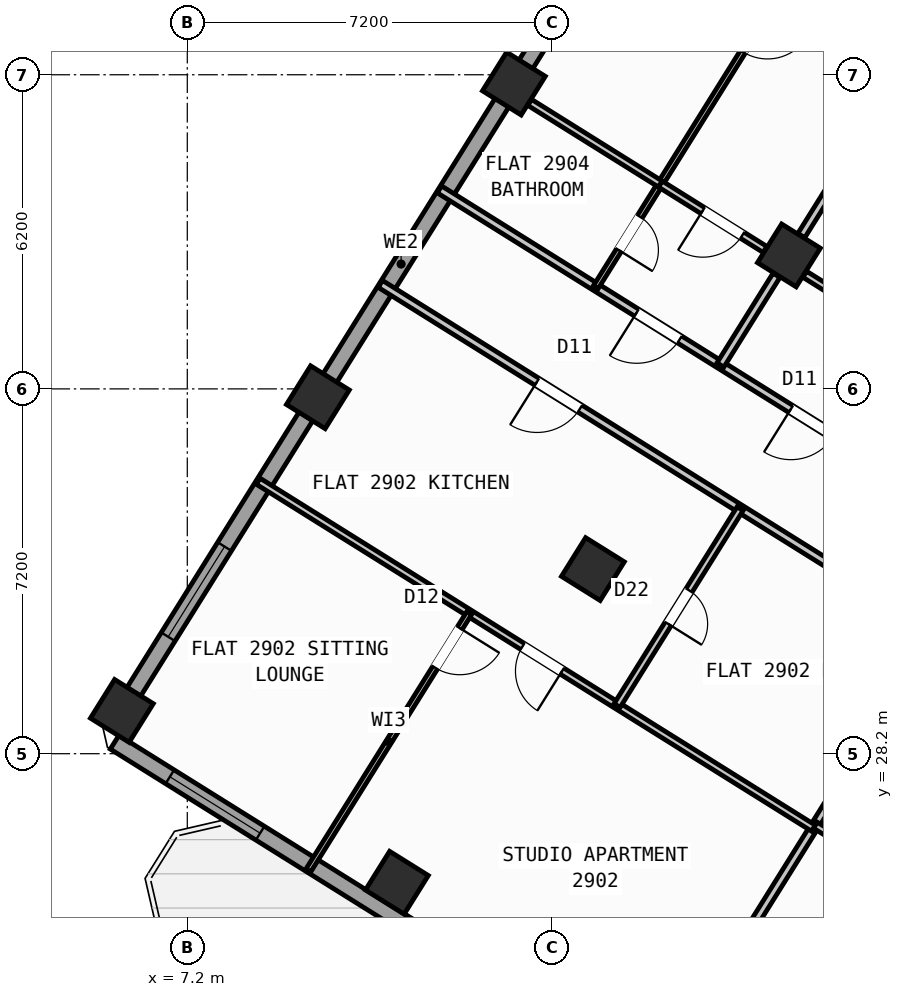
"""IFC4 building model, lengths in metres.
Left out: names, types, materials, properties, quantities, classifications, styles, units other than length and angle.
Written with IfcOpenShell. Run it as: python <this file> out.ifc"""

import sys

from ifc_helpers import new_model, si_unit, direction, frame, frame_2d, origin, origin_2d, place, context, subcontext, project, spatial, rectangle, hollow_rectangle, extrude, source, transform, mapped, element, fill, save


model = new_model("IFC4")
c1 = context("Model", 3, precision=1e-05, world=origin(), true_north=direction((0.0, 1.0)))
c2 = subcontext(c1, "Body", "Model", "MODEL_VIEW")
j1 = project(units=[si_unit("LENGTHUNIT", "METRE"), si_unit("PLANEANGLEUNIT", "RADIAN")], contexts=[c1])
p1 = place(None, origin())
s1 = spatial("IfcSite", under=j1, at=p1, CompositionType="ELEMENT")
p2 = place(p1, origin())
s2 = spatial("IfcBuilding", under=s1, at=p2, CompositionType="ELEMENT")
p3 = place(p2, frame((0.0, 0.0, 116.1)))
s3 = spatial("IfcBuildingStorey", under=s2, at=p3, CompositionType="ELEMENT", Elevation=116.1)
m1 = source(origin(), c2, "Body", "SweptSolid", [
    extrude(hollow_rectangle(XDim=0.9, YDim=0.9, WallThickness=0.036, at=origin_2d()), origin(), (0.0, 0.0, 1.0), 3.6),
])
for number, where, z_axis, x_axis in (
    (1, (19.073, 38.034, 0.0), (0.0, 0.0, 1.0), (-0.848, 0.53, 0.0)),
    (2, (15.205, 31.844, 0.0), (0.0, 0.0, 1.0), (-0.848, 0.53, 0.0)),
    (3, (11.336, 25.653, 0.0), (0.0, 0.0, 1.0), (-0.848, 0.53, 0.0)),
    (4, (13.646, 41.426, 0.0), (0.0, 0.0, 1.0), (-0.848, 0.53, 0.0)),
    (5, (9.777, 35.235, 0.0), (0.0, 0.0, 1.0), (-0.848, 0.53, 0.0)),
    (6, (5.909, 29.044, 0.0), (0.0, 0.0, 1.0), (-0.848, 0.53, 0.0)),
):
    element("IfcColumn", number, at=place(p3, frame(where, z_axis=z_axis, x_axis=x_axis)), inside=s3, PredefinedType="COLUMN", context=c2, shape_type="MappedRepresentation", body=[
        mapped(m1, transform((0.0, 0.0, 0.0), scale=1.0)),
    ])
p4 = place(p3, frame((31.76, 12.183, 0.0), z_axis=(0.0, 0.0, 1.0), x_axis=(-0.848047074256, 0.529920899612, 0.0)))
e7 = element("IfcWall", 7, at=p4, inside=s3, PredefinedType="STANDARD", context=c2, shape_type="SweptSolid", body=[
    extrude(rectangle(XDim=30.652, YDim=0.32, at=frame_2d((15.326, 0.0))), origin(), (0.0, 0.0, 1.0), 3.35),
])
p5 = place(p4, frame((15.153, 0.0, 0.0)))
e8 = element("IfcOpeningElement", 8, at=p5, cuts=e7, PredefinedType="OPENING", context=c2, shape_type="SweptSolid", body=[
    extrude(rectangle(XDim=1.2, YDim=2.15, at=frame_2d((0.6, 1.075))), frame((0.0, 0.17, 0.0), z_axis=(0.0, -1.0, 0.0), x_axis=(1.0, 0.0, 0.0)), (0.0, 0.0, 1.0), 0.34),
])
p6 = place(p4, frame((2.002, 0.0, 0.8)))
e9 = element("IfcOpeningElement", 9, at=p6, cuts=e7, PredefinedType="OPENING", context=c2, shape_type="SweptSolid", body=[
    extrude(rectangle(XDim=2.1, YDim=1.55, at=frame_2d((1.05, 0.775))), frame((0.0, 0.17, 0.0), z_axis=(0.0, -1.0, 0.0), x_axis=(1.0, 0.0, 0.0)), (0.0, 0.0, 1.0), 0.34),
])
p7 = place(p4, frame((7.206, 0.0, 0.8)))
e10 = element("IfcOpeningElement", 10, at=p7, cuts=e7, PredefinedType="OPENING", context=c2, shape_type="SweptSolid", body=[
    extrude(rectangle(XDim=2.1, YDim=1.55, at=frame_2d((1.05, 0.775))), frame((0.0, 0.17, 0.0), z_axis=(0.0, -1.0, 0.0), x_axis=(1.0, 0.0, 0.0)), (0.0, 0.0, 1.0), 0.34),
])
p8 = place(p4, frame((12.648, 0.0, 1.0)))
e11 = element("IfcOpeningElement", 11, at=p8, cuts=e7, PredefinedType="OPENING", context=c2, shape_type="SweptSolid", body=[
    extrude(rectangle(XDim=0.9, YDim=1.25, at=frame_2d((0.45, 0.625))), frame((0.0, 0.17, 0.0), z_axis=(0.0, -1.0, 0.0), x_axis=(1.0, 0.0, 0.0)), (0.0, 0.0, 1.0), 0.34),
])
p9 = place(p4, frame((19.458, 0.0, 0.95)))
e12 = element("IfcOpeningElement", 12, at=p9, cuts=e7, PredefinedType="OPENING", context=c2, shape_type="SweptSolid", body=[
    extrude(rectangle(XDim=1.2, YDim=1.4, at=frame_2d((0.6, 0.7))), frame((0.0, 0.17, 0.0), z_axis=(0.0, -1.0, 0.0), x_axis=(1.0, 0.0, 0.0)), (0.0, 0.0, 1.0), 0.34),
])
p10 = place(p4, frame((21.858, 0.0, 0.95)))
e13 = element("IfcOpeningElement", 13, at=p10, cuts=e7, PredefinedType="OPENING", context=c2, shape_type="SweptSolid", body=[
    extrude(rectangle(XDim=1.2, YDim=1.4, at=frame_2d((0.6, 0.7))), frame((0.0, 0.17, 0.0), z_axis=(0.0, -1.0, 0.0), x_axis=(1.0, 0.0, 0.0)), (0.0, 0.0, 1.0), 0.34),
])
p11 = place(p4, frame((27.266, 0.0, 0.8)))
e14 = element("IfcOpeningElement", 14, at=p11, cuts=e7, PredefinedType="OPENING", context=c2, shape_type="SweptSolid", body=[
    extrude(rectangle(XDim=2.1, YDim=1.55, at=frame_2d((1.05, 0.775))), frame((0.0, 0.17, 0.0), z_axis=(0.0, -1.0, 0.0), x_axis=(1.0, 0.0, 0.0)), (0.0, 0.0, 1.0), 0.34),
])
p12 = place(p3, frame((5.7, 28.71, 0.0), z_axis=(0.0, 0.0, 1.0), x_axis=(0.529923711467, 0.8480453172, 0.0)))
e15 = element("IfcWall", 15, at=p12, inside=s3, PredefinedType="STANDARD", context=c2, shape_type="SweptSolid", body=[
    extrude(rectangle(XDim=21.587, YDim=0.32, at=frame_2d((10.794, 0.0))), origin(), (0.0, 0.0, 1.0), 2.775),
])
p13 = place(p12, frame((2.119, 0.0, 0.8)))
e16 = element("IfcOpeningElement", 16, at=p13, cuts=e15, PredefinedType="OPENING", context=c2, shape_type="SweptSolid", body=[
    extrude(rectangle(XDim=2.1, YDim=1.55, at=frame_2d((1.05, 0.775))), frame((0.0, 0.17, 0.0), z_axis=(0.0, -1.0, 0.0), x_axis=(1.0, 0.0, 0.0)), (0.0, 0.0, 1.0), 0.34),
])
p14 = place(p12, frame((17.256, 0.0, 0.85)))
e17 = element("IfcOpeningElement", 17, at=p14, cuts=e15, PredefinedType="OPENING", context=c2, shape_type="SweptSolid", body=[
    extrude(rectangle(XDim=1.8, YDim=1.5, at=frame_2d((0.9, 0.75))), frame((0.0, 0.17, 0.0), z_axis=(0.0, -1.0, 0.0), x_axis=(1.0, 0.0, 0.0)), (0.0, 0.0, 1.0), 0.34),
])
p15 = place(p3, frame((17.424, 47.083, 0.0), z_axis=(0.0, 0.0, 1.0), x_axis=(0.848049927979, -0.529916332693, 0.0)))
e18 = element("IfcWall", 18, at=p15, inside=s3, PredefinedType="STANDARD", context=c2, shape_type="SweptSolid", body=[
    extrude(rectangle(XDim=29.223, YDim=0.32, at=frame_2d((14.612, 0.0))), origin(), (0.0, 0.0, 1.0), 3.35),
])
p16 = place(p15, frame((8.839, 0.0, 0.0)))
e19 = element("IfcOpeningElement", 19, at=p16, cuts=e18, PredefinedType="OPENING", context=c2, shape_type="SweptSolid", body=[
    extrude(rectangle(XDim=1.05, YDim=2.15, at=frame_2d((0.525, 1.075))), frame((0.0, 0.17, 0.0), z_axis=(0.0, -1.0, 0.0), x_axis=(1.0, 0.0, 0.0)), (0.0, 0.0, 1.0), 0.34),
])
p17 = place(p15, frame((0.719, 0.0, 0.85)))
e20 = element("IfcOpeningElement", 20, at=p17, cuts=e18, PredefinedType="OPENING", context=c2, shape_type="SweptSolid", body=[
    extrude(rectangle(XDim=1.8, YDim=1.5, at=frame_2d((0.9, 0.75))), frame((0.0, 0.17, 0.0), z_axis=(0.0, -1.0, 0.0), x_axis=(1.0, 0.0, 0.0)), (0.0, 0.0, 1.0), 0.34),
])
p18 = place(p15, frame((3.981, 0.0, 0.85)))
e21 = element("IfcOpeningElement", 21, at=p18, cuts=e18, PredefinedType="OPENING", context=c2, shape_type="SweptSolid", body=[
    extrude(rectangle(XDim=1.5, YDim=1.5, at=frame_2d((0.75, 0.75))), frame((0.0, 0.17, 0.0), z_axis=(0.0, -1.0, 0.0), x_axis=(1.0, 0.0, 0.0)), (0.0, 0.0, 1.0), 0.34),
])
p19 = place(p15, frame((7.021, 0.0, 0.95)))
e22 = element("IfcOpeningElement", 22, at=p19, cuts=e18, PredefinedType="OPENING", context=c2, shape_type="SweptSolid", body=[
    extrude(rectangle(XDim=1.2, YDim=1.4, at=frame_2d((0.6, 0.7))), frame((0.0, 0.17, 0.0), z_axis=(0.0, -1.0, 0.0), x_axis=(1.0, 0.0, 0.0)), (0.0, 0.0, 1.0), 0.34),
])
p20 = place(p15, frame((14.471, 0.0, 0.95)))
e23 = element("IfcOpeningElement", 23, at=p20, cuts=e18, PredefinedType="OPENING", context=c2, shape_type="SweptSolid", body=[
    extrude(rectangle(XDim=1.2, YDim=1.4, at=frame_2d((0.6, 0.7))), frame((0.0, 0.17, 0.0), z_axis=(0.0, -1.0, 0.0), x_axis=(1.0, 0.0, 0.0)), (0.0, 0.0, 1.0), 0.34),
])
p21 = place(p15, frame((17.254, 0.0, 1.0)))
e24 = element("IfcOpeningElement", 24, at=p21, cuts=e18, PredefinedType="OPENING", context=c2, shape_type="SweptSolid", body=[
    extrude(rectangle(XDim=0.9, YDim=1.25, at=frame_2d((0.45, 0.625))), frame((0.0, 0.17, 0.0), z_axis=(0.0, -1.0, 0.0), x_axis=(1.0, 0.0, 0.0)), (0.0, 0.0, 1.0), 0.34),
])
p22 = place(p15, frame((20.764, 0.0, 0.8)))
e25 = element("IfcOpeningElement", 25, at=p22, cuts=e18, PredefinedType="OPENING", context=c2, shape_type="SweptSolid", body=[
    extrude(rectangle(XDim=2.1, YDim=1.55, at=frame_2d((1.05, 0.775))), frame((0.0, 0.17, 0.0), z_axis=(0.0, -1.0, 0.0), x_axis=(1.0, 0.0, 0.0)), (0.0, 0.0, 1.0), 0.34),
])
p23 = place(p15, frame((25.403, 0.0, 0.8)))
e26 = element("IfcOpeningElement", 26, at=p23, cuts=e18, PredefinedType="OPENING", context=c2, shape_type="SweptSolid", body=[
    extrude(rectangle(XDim=2.1, YDim=1.55, at=frame_2d((1.05, 0.775))), frame((0.0, 0.17, 0.0), z_axis=(0.0, -1.0, 0.0), x_axis=(1.0, 0.0, 0.0)), (0.0, 0.0, 1.0), 0.34),
])
p24 = place(p3, frame((25.198, 28.606, 0.0), z_axis=(0.0, 0.0, 1.0), x_axis=(-0.529926497642, -0.848043576178, 0.0)))
e27 = element("IfcWall", 27, at=p24, inside=s3, PredefinedType="PARTITIONING", context=c2, shape_type="SweptSolid", body=[
    extrude(rectangle(XDim=10.3, YDim=0.16, at=frame_2d((5.15, 0.0))), origin(), (0.0, 0.0, 1.0), 3.34),
])
p25 = place(p3, frame((26.363, 30.472, 0.0), z_axis=(0.0, 0.0, 1.0), x_axis=(-0.848052408131, 0.529912363569, 0.0)))
e28 = element("IfcWall", 28, at=p25, inside=s3, PredefinedType="PARTITIONING", context=c2, shape_type="SweptSolid", body=[
    extrude(rectangle(XDim=16.73, YDim=0.16, at=frame_2d((8.365, 0.0))), origin(), (0.0, 0.0, 1.0), 3.34),
])
p26 = place(p25, frame((7.55, 0.0, 0.0)))
e29 = element("IfcOpeningElement", 29, at=p26, cuts=e28, PredefinedType="OPENING", context=c2, shape_type="SweptSolid", body=[
    extrude(rectangle(XDim=1.0, YDim=2.1, at=frame_2d((0.5, 1.05))), frame((0.0, 0.09, 0.0), z_axis=(0.0, -1.0, 0.0), x_axis=(1.0, 0.0, 0.0)), (0.0, 0.0, 1.0), 0.18),
])
p27 = place(p25, frame((11.14, 0.0, 0.0)))
e30 = element("IfcOpeningElement", 30, at=p27, cuts=e28, PredefinedType="OPENING", context=c2, shape_type="SweptSolid", body=[
    extrude(rectangle(XDim=1.0, YDim=2.1, at=frame_2d((0.5, 1.05))), frame((0.0, 0.09, 0.0), z_axis=(0.0, -1.0, 0.0), x_axis=(1.0, 0.0, 0.0)), (0.0, 0.0, 1.0), 0.18),
])
p28 = place(p3, frame((25.198, 28.606, 0.0), z_axis=(0.0, 0.0, 1.0), x_axis=(-0.848052408131, 0.529912363569, 0.0)))
e31 = element("IfcWall", 31, at=p28, inside=s3, PredefinedType="PARTITIONING", context=c2, shape_type="SweptSolid", body=[
    extrude(rectangle(XDim=16.73, YDim=0.16, at=frame_2d((8.365, 0.0))), origin(), (0.0, 0.0, 1.0), 3.34),
])
p29 = place(p28, frame((2.22, 0.0, 0.0)))
e32 = element("IfcOpeningElement", 32, at=p29, cuts=e31, PredefinedType="OPENING", context=c2, shape_type="SweptSolid", body=[
    extrude(rectangle(XDim=0.86, YDim=2.05, at=frame_2d((0.43, 1.025))), frame((0.0, 0.09, 0.0), z_axis=(0.0, -1.0, 0.0), x_axis=(1.0, 0.0, 0.0)), (0.0, 0.0, 1.0), 0.18),
])
p30 = place(p28, frame((12.084, 0.0, 0.0)))
e33 = element("IfcOpeningElement", 33, at=p30, cuts=e31, PredefinedType="OPENING", context=c2, shape_type="SweptSolid", body=[
    extrude(rectangle(XDim=1.0, YDim=2.1, at=frame_2d((0.5, 1.05))), frame((0.0, 0.09, 0.0), z_axis=(0.0, -1.0, 0.0), x_axis=(1.0, 0.0, 0.0)), (0.0, 0.0, 1.0), 0.18),
])
p31 = place(p3, frame((20.387, 28.06, 0.0), z_axis=(0.0, 0.0, 1.0), x_axis=(-0.529902564924, -0.848058530814, 0.0)))
e34 = element("IfcWall", 34, at=p31, inside=s3, PredefinedType="PARTITIONING", context=c2, shape_type="SweptSolid", body=[
    extrude(rectangle(XDim=6.376, YDim=0.16, at=frame_2d((3.188, 0.0))), origin(), (0.0, 0.0, 1.0), 2.775),
])
p32 = place(p3, frame((22.807, 24.781, 0.0), z_axis=(0.0, 0.0, 1.0), x_axis=(-0.84803087207, 0.529946827537, 0.0)))
e35 = element("IfcWall", 35, at=p32, inside=s3, PredefinedType="PLUMBINGWALL", context=c2, shape_type="SweptSolid", body=[
    extrude(rectangle(XDim=3.79, YDim=0.14, at=frame_2d((1.895, 0.0))), origin(), (0.0, 0.0, 1.0), 3.34),
])
p33 = place(p32, frame((2.23, 0.0, 0.0)))
e36 = element("IfcOpeningElement", 36, at=p33, cuts=e35, PredefinedType="OPENING", context=c2, shape_type="SweptSolid", body=[
    extrude(rectangle(XDim=0.92, YDim=2.08, at=frame_2d((0.46, 1.04))), frame((0.0, 0.08, 0.0), z_axis=(0.0, -1.0, 0.0), x_axis=(1.0, 0.0, 0.0)), (0.0, 0.0, 1.0), 0.16),
])
p34 = place(p3, frame((19.556, 26.73, 0.0), z_axis=(0.0, 0.0, 1.0), x_axis=(-0.848043949058, 0.52992590092, 0.0)))
e37 = element("IfcWall", 37, at=p34, inside=s3, PredefinedType="PLUMBINGWALL", context=c2, shape_type="SweptSolid", body=[
    extrude(rectangle(XDim=12.92, YDim=0.14, at=frame_2d((6.46, 0.0))), origin(), (0.0, 0.0, 1.0), 3.34),
])
p35 = place(p34, frame((5.849, 0.0, 0.0)))
e38 = element("IfcOpeningElement", 38, at=p35, cuts=e37, PredefinedType="OPENING", context=c2, shape_type="SweptSolid", body=[
    extrude(rectangle(XDim=0.92, YDim=2.08, at=frame_2d((0.46, 1.04))), frame((0.0, 0.08, 0.0), z_axis=(0.0, -1.0, 0.0), x_axis=(1.0, 0.0, 0.0)), (0.0, 0.0, 1.0), 0.16),
])
p36 = place(p3, frame((18.109, 33.035, 0.0), z_axis=(0.0, 0.0, 1.0), x_axis=(-0.529893526057, -0.848064178611, 0.0)))
e39 = element("IfcWall", 39, at=p36, inside=s3, PredefinedType="PLUMBINGWALL", context=c2, shape_type="SweptSolid", body=[
    extrude(rectangle(XDim=4.58, YDim=0.14, at=frame_2d((2.29, 0.0))), origin(), (0.0, 0.0, 1.0), 3.34),
])
p37 = place(p36, frame((1.9, 0.0, 0.0)))
e40 = element("IfcOpeningElement", 40, at=p37, cuts=e39, PredefinedType="OPENING", context=c2, shape_type="SweptSolid", body=[
    extrude(rectangle(XDim=0.78, YDim=2.05, at=frame_2d((0.39, 1.025))), frame((0.0, 0.08, 0.0), z_axis=(0.0, -1.0, 0.0), x_axis=(1.0, 0.0, 0.0)), (0.0, 0.0, 1.0), 0.16),
])
p38 = place(p3, frame((12.763, 30.975, 0.0), z_axis=(0.0, 0.0, 1.0), x_axis=(-0.529947646893, -0.848030360042, 0.0)))
e41 = element("IfcWall", 41, at=p38, inside=s3, PredefinedType="PARTITIONING", context=c2, shape_type="SweptSolid", body=[
    extrude(rectangle(XDim=5.99, YDim=0.11, at=frame_2d((2.995, 0.0))), origin(), (0.0, 0.0, 1.0), 3.34),
])
p39 = place(p38, frame((0.35, 0.0, 0.0)))
e42 = element("IfcOpeningElement", 42, at=p39, cuts=e41, PredefinedType="OPENING", context=c2, shape_type="SweptSolid", body=[
    extrude(rectangle(XDim=0.92, YDim=2.08, at=frame_2d((0.46, 1.04))), frame((0.0, 0.065, 0.0), z_axis=(0.0, -1.0, 0.0), x_axis=(1.0, 0.0, 0.0)), (0.0, 0.0, 1.0), 0.13),
])
p40 = place(p3, frame((22.18, 43.006, 0.0), z_axis=(0.0, 0.0, 1.0), x_axis=(-0.529913610495, -0.848051628978, 0.0)))
e43 = element("IfcWall", 43, at=p40, inside=s3, PredefinedType="PARTITIONING", context=c2, shape_type="SweptSolid", body=[
    extrude(rectangle(XDim=5.401, YDim=0.16, at=frame_2d((2.7, 0.0))), origin(), (0.0, 0.0, 1.0), 2.775),
])
p41 = place(p3, frame((18.828, 37.643, 0.0), z_axis=(0.0, 0.0, 1.0), x_axis=(-0.529904345651, -0.848057418139, 0.0)))
e44 = element("IfcWall", 44, at=p41, inside=s3, PredefinedType="PARTITIONING", context=c2, shape_type="SweptSolid", body=[
    extrude(rectangle(XDim=2.088, YDim=0.16, at=frame_2d((1.044, 0.0))), origin(), (0.0, 0.0, 1.0), 2.775),
])
p42 = place(p3, frame((22.623, 35.639, 0.0), z_axis=(0.0, 0.0, 1.0), x_axis=(-0.8480485946, 0.529918466555, 0.0)))
e45 = element("IfcWall", 45, at=p42, inside=s3, PredefinedType="PLUMBINGWALL", context=c2, shape_type="SweptSolid", body=[
    extrude(rectangle(XDim=3.818, YDim=0.14, at=frame_2d((1.909, 0.0))), origin(), (0.0, 0.0, 1.0), 2.775),
])
p43 = place(p42, frame((1.68, 0.0, 0.0)))
e46 = element("IfcOpeningElement", 46, at=p43, cuts=e45, PredefinedType="OPENING", context=c2, shape_type="SweptSolid", body=[
    extrude(rectangle(XDim=0.92, YDim=2.08, at=frame_2d((0.46, 1.04))), frame((0.0, 0.08, 0.0), z_axis=(0.0, -1.0, 0.0), x_axis=(1.0, 0.0, 0.0)), (0.0, 0.0, 1.0), 0.16),
])
p44 = place(p3, frame((20.281, 45.44, 0.0), z_axis=(0.0, 0.0, 1.0), x_axis=(-0.529917830441, -0.848048992088, 0.0)))
e47 = element("IfcWall", 47, at=p44, inside=s3, PredefinedType="PARTITIONING", context=c2, shape_type="SweptSolid", body=[
    extrude(rectangle(XDim=9.47, YDim=0.11, at=frame_2d((4.735, 0.0))), origin(), (0.0, 0.0, 1.0), 3.34),
])
p45 = place(p44, frame((7.83, 0.0, 0.0)))
e48 = element("IfcOpeningElement", 48, at=p45, cuts=e47, PredefinedType="OPENING", context=c2, shape_type="SweptSolid", body=[
    extrude(rectangle(XDim=0.78, YDim=2.05, at=frame_2d((0.39, 1.025))), frame((0.0, 0.065, 0.0), z_axis=(0.0, -1.0, 0.0), x_axis=(1.0, 0.0, 0.0)), (0.0, 0.0, 1.0), 0.13),
])
p46 = place(p44, frame((3.075, 0.0, 0.0)))
e49 = element("IfcOpeningElement", 49, at=p46, cuts=e47, PredefinedType="OPENING", context=c2, shape_type="SweptSolid", body=[
    extrude(rectangle(XDim=0.92, YDim=2.08, at=frame_2d((0.46, 1.04))), frame((0.0, 0.065, 0.0), z_axis=(0.0, -1.0, 0.0), x_axis=(1.0, 0.0, 0.0)), (0.0, 0.0, 1.0), 0.13),
])
p47 = place(p3, frame((18.602, 38.152, 0.0), z_axis=(0.0, 0.0, 1.0), x_axis=(-0.848020807548, 0.529962932634, 0.0)))
e50 = element("IfcWall", 50, at=p47, inside=s3, PredefinedType="PLUMBINGWALL", context=c2, shape_type="SweptSolid", body=[
    extrude(rectangle(XDim=2.438, YDim=0.14, at=frame_2d((1.219, 0.0))), origin(), (0.0, 0.0, 1.0), 2.775),
])
p48 = place(p47, frame((0.528, 0.0, 0.0)))
e51 = element("IfcOpeningElement", 51, at=p48, cuts=e50, PredefinedType="OPENING", context=c2, shape_type="SweptSolid", body=[
    extrude(rectangle(XDim=0.92, YDim=2.08, at=frame_2d((0.46, 1.04))), frame((0.0, 0.08, 0.0), z_axis=(0.0, -1.0, 0.0), x_axis=(1.0, 0.0, 0.0)), (0.0, 0.0, 1.0), 0.16),
])
p49 = place(p3, frame((16.534, 39.444, 0.0), z_axis=(0.0, 0.0, 1.0), x_axis=(-0.848056989933, 0.52990503095, 0.0)))
e52 = element("IfcWall", 52, at=p49, inside=s3, PredefinedType="PLUMBINGWALL", context=c2, shape_type="SweptSolid", body=[
    extrude(rectangle(XDim=3.038, YDim=0.14, at=frame_2d((1.519, 0.0))), origin(), (0.0, 0.0, 1.0), 2.775),
])
m2 = source(origin(), c2, "Body", "SweptSolid", [
    extrude(rectangle(XDim=2.1, YDim=1.55, at=frame_2d((1.05, 0.775))), frame((0.0, 0.03, 0.0), z_axis=(0.0, -1.0, 0.0), x_axis=(1.0, 0.0, 0.0)), (0.0, 0.0, 1.0), 0.06),
])
p50 = place(p11, origin())
e53 = element("IfcWindow", 53, at=p50, inside=s3, PartitioningType="SINGLE_PANEL", PredefinedType="WINDOW", context=c2, shape_type="MappedRepresentation", body=[
    mapped(m2, transform((0.0, 0.0, 0.0), scale=1.0)),
])
fill(e14, e53)
p51 = place(p13, origin())
e54 = element("IfcWindow", 54, at=p51, inside=s3, PartitioningType="SINGLE_PANEL", PredefinedType="WINDOW", context=c2, shape_type="MappedRepresentation", body=[
    mapped(m2, transform((0.0, 0.0, 0.0), scale=1.0)),
])
fill(e16, e54)
m3 = source(origin(), c2, "Body", "SweptSolid", [
    extrude(rectangle(XDim=0.92, YDim=2.08, at=frame_2d((0.46, 1.04))), frame((0.0, 0.025, 0.0), z_axis=(0.0, -1.0, 0.0), x_axis=(1.0, 0.0, 0.0)), (0.0, 0.0, 1.0), 0.05),
])
p52 = place(p39, origin())
e55 = element("IfcDoor", 55, at=p52, inside=s3, OperationType="SINGLE_SWING_LEFT", PredefinedType="DOOR", context=c2, shape_type="MappedRepresentation", body=[
    mapped(m3, transform((0.0, 0.0, 0.0), scale=1.0)),
])
fill(e42, e55)
m4 = source(origin(), c2, "Body", "SweptSolid", [
    extrude(rectangle(XDim=1.0, YDim=2.1, at=frame_2d((0.5, 1.05))), frame((0.0, 0.025, 0.0), z_axis=(0.0, -1.0, 0.0), x_axis=(1.0, 0.0, 0.0)), (0.0, 0.0, 1.0), 0.05),
])
p53 = place(p30, origin())
e56 = element("IfcDoor", 56, at=p53, inside=s3, OperationType="SINGLE_SWING_RIGHT", PredefinedType="DOOR", context=c2, shape_type="MappedRepresentation", body=[
    mapped(m4, transform((0.0, 0.0, 0.0), scale=1.0)),
])
fill(e33, e56)
p54 = place(p35, origin())
e57 = element("IfcDoor", 57, at=p54, inside=s3, OperationType="SINGLE_SWING_LEFT", PredefinedType="DOOR", context=c2, shape_type="MappedRepresentation", body=[
    mapped(m3, transform((0.0, 0.0, 0.0), scale=1.0)),
])
fill(e38, e57)
m5 = source(origin(), c2, "Body", "SweptSolid", [
    extrude(rectangle(XDim=0.78, YDim=2.05, at=frame_2d((0.39, 1.025))), frame((0.0, 0.025, 0.0), z_axis=(0.0, -1.0, 0.0), x_axis=(1.0, 0.0, 0.0)), (0.0, 0.0, 1.0), 0.05),
])
p55 = place(p37, origin())
e58 = element("IfcDoor", 58, at=p55, inside=s3, OperationType="SINGLE_SWING_RIGHT", PredefinedType="DOOR", context=c2, shape_type="MappedRepresentation", body=[
    mapped(m5, transform((0.0, 0.0, 0.0), scale=1.0)),
])
fill(e40, e58)
p56 = place(p26, origin())
e59 = element("IfcDoor", 59, at=p56, inside=s3, OperationType="SINGLE_SWING_RIGHT", PredefinedType="DOOR", context=c2, shape_type="MappedRepresentation", body=[
    mapped(m4, transform((0.0, 0.0, 0.0), scale=1.0)),
])
fill(e29, e59)
p57 = place(p27, origin())
e60 = element("IfcDoor", 60, at=p57, inside=s3, OperationType="SINGLE_SWING_RIGHT", PredefinedType="DOOR", context=c2, shape_type="MappedRepresentation", body=[
    mapped(m4, transform((0.0, 0.0, 0.0), scale=1.0)),
])
fill(e30, e60)
p58 = place(p48, origin())
e61 = element("IfcDoor", 61, at=p58, inside=s3, OperationType="SINGLE_SWING_RIGHT", PredefinedType="DOOR", context=c2, shape_type="MappedRepresentation", body=[
    mapped(m3, transform((0.0, 0.0, 0.0), scale=1.0)),
])
fill(e51, e61)
p59 = place(p45, origin())
e62 = element("IfcDoor", 62, at=p59, inside=s3, OperationType="SINGLE_SWING_RIGHT", PredefinedType="DOOR", context=c2, shape_type="MappedRepresentation", body=[
    mapped(m5, transform((0.0, 0.0, 0.0), scale=1.0)),
])
fill(e48, e62)
p60 = place(p46, origin())
e63 = element("IfcDoor", 63, at=p60, inside=s3, OperationType="SINGLE_SWING_LEFT", PredefinedType="DOOR", context=c2, shape_type="MappedRepresentation", body=[
    mapped(m3, transform((0.0, 0.0, 0.0), scale=1.0)),
])
fill(e49, e63)
save(model, sys.argv[1])
